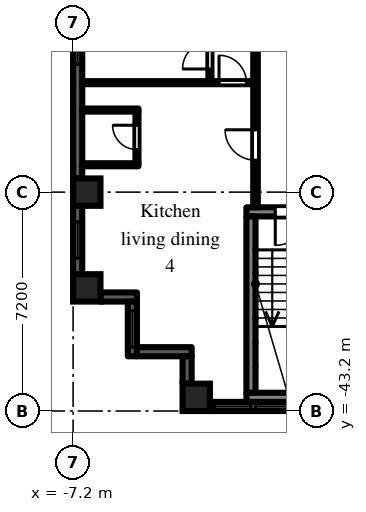
"""IFC4 building model, lengths in metres.
Left out: names, types, materials, properties, quantities, classifications, styles, units other than length and angle.
Written with IfcOpenShell. Run it as: python <this file> out.ifc"""

import sys

from ifc_helpers import new_model, si_unit, direction, frame, frame_2d, origin, origin_2d, place, context, subcontext, project, spatial, rectangle, extrude, element, fill, save


model = new_model("IFC4")
c1 = context("Model", 3, precision=1e-05, world=origin(), true_north=direction((0.0, 1.0)))
c2 = subcontext(c1, "Body", "Model", "MODEL_VIEW")
j1 = project(units=[si_unit("LENGTHUNIT", "METRE"), si_unit("PLANEANGLEUNIT", "RADIAN")], contexts=[c1])
p1 = place(None, origin())
s1 = spatial("IfcSite", under=j1, at=p1, CompositionType="ELEMENT")
p2 = place(p1, origin())
s2 = spatial("IfcBuilding", under=s1, at=p2, CompositionType="ELEMENT")
p3 = place(p2, frame((0.0, 0.0, 20.7)))
s3 = spatial("IfcBuildingStorey", under=s2, at=p3, CompositionType="ELEMENT", Elevation=20.7)
for number, where, z_axis, x_axis in (
    (1, (-6.75, -39.15, 0.0), (0.0, 0.0, 1.0), (1.0, 0.0, 0.0)),
    (2, (-6.75, -36.0, 0.0), (0.0, 0.0, 1.0), (1.0, 0.0, 0.0)),
    (3, (-3.15, -42.75, 0.0), (0.0, 0.0, 1.0), (1.0, 0.0, 0.0)),
):
    element("IfcColumn", number, at=place(p3, frame(where, z_axis=z_axis, x_axis=x_axis)), inside=s3, PredefinedType="COLUMN", context=c2, shape_type="SweptSolid", body=[
        extrude(rectangle(XDim=0.9, YDim=0.9, at=origin_2d()), origin(), (0.0, 0.0, 1.0), 3.0),
    ])
p4 = place(p3, frame((-7.05, -29.25, 0.0), z_axis=(0.0, 0.0, 1.0), x_axis=(0.0, -1.0, 0.0)))
e4 = element("IfcWall", 4, at=p4, inside=s3, PredefinedType="SOLIDWALL", context=c2, shape_type="SweptSolid", body=[
    extrude(rectangle(XDim=6.3, YDim=0.3, at=frame_2d((3.15, 0.0))), origin(), (0.0, 0.0, 1.0), 2.1),
])
p5 = place(p4, frame((0.15, 0.0, 0.2)))
e5 = element("IfcOpeningElement", 5, at=p5, cuts=e4, PredefinedType="OPENING", context=c2, shape_type="SweptSolid", body=[
    extrude(rectangle(XDim=2.4, YDim=1.85, at=frame_2d((1.2, 0.925))), frame((0.0, 0.16, 0.0), z_axis=(0.0, -1.0, 0.0), x_axis=(1.0, 0.0, 0.0)), (0.0, 0.0, 1.0), 0.32),
])
p6 = place(p3, frame((-7.05, -36.45, 0.0), z_axis=(0.0, 0.0, 1.0), x_axis=(0.0, -1.0, 0.0)))
e6 = element("IfcWall", 6, at=p6, inside=s3, PredefinedType="SOLIDWALL", context=c2, shape_type="SweptSolid", body=[
    extrude(rectangle(XDim=2.25, YDim=0.3, at=frame_2d((1.125, 0.0))), origin(), (0.0, 0.0, 1.0), 2.1),
])
p7 = place(p6, frame((0.525, 0.0, 0.2)))
e7 = element("IfcOpeningElement", 7, at=p7, cuts=e6, PredefinedType="OPENING", context=c2, shape_type="SweptSolid", body=[
    extrude(rectangle(XDim=1.2, YDim=1.85, at=frame_2d((0.6, 0.925))), frame((0.0, 0.16, 0.0), z_axis=(0.0, -1.0, 0.0), x_axis=(1.0, 0.0, 0.0)), (0.0, 0.0, 1.0), 0.32),
])
p8 = place(p3, frame((-6.3, -39.45, 0.0), z_axis=(0.0, 0.0, 1.0), x_axis=(1.0, 0.0, 0.0)))
e8 = element("IfcWall", 8, at=p8, inside=s3, PredefinedType="SOLIDWALL", context=c2, shape_type="SweptSolid", body=[
    extrude(rectangle(XDim=1.2, YDim=0.3, at=frame_2d((0.6, 0.0))), origin(), (0.0, 0.0, 1.0), 2.575),
])
p9 = place(p3, frame((-5.25, -39.6, 0.0), z_axis=(0.0, 0.0, 1.0), x_axis=(0.0, -1.0, 0.0)))
e9 = element("IfcWall", 9, at=p9, inside=s3, PredefinedType="SOLIDWALL", context=c2, shape_type="SweptSolid", body=[
    extrude(rectangle(XDim=1.8, YDim=0.3, at=frame_2d((0.9, 0.0))), origin(), (0.0, 0.0, 1.0), 2.575),
])
p10 = place(p9, frame((0.3, 0.0, 0.2)))
e10 = element("IfcOpeningElement", 10, at=p10, cuts=e9, PredefinedType="OPENING", context=c2, shape_type="SweptSolid", body=[
    extrude(rectangle(XDim=1.2, YDim=1.85, at=frame_2d((0.6, 0.925))), frame((0.0, 0.16, 0.0), z_axis=(0.0, -1.0, 0.0), x_axis=(1.0, 0.0, 0.0)), (0.0, 0.0, 1.0), 0.32),
])
p11 = place(p3, frame((-5.1, -41.25, 0.0), z_axis=(0.0, 0.0, 1.0), x_axis=(1.0, 0.0, 0.0)))
e11 = element("IfcWall", 11, at=p11, inside=s3, PredefinedType="SOLIDWALL", context=c2, shape_type="SweptSolid", body=[
    extrude(rectangle(XDim=1.8, YDim=0.3, at=frame_2d((0.9, 0.0))), origin(), (0.0, 0.0, 1.0), 2.575),
])
p12 = place(p3, frame((-3.45, -41.4, 0.0), z_axis=(0.0, 0.0, 1.0), x_axis=(0.0, -1.0, 0.0)))
e12 = element("IfcWall", 12, at=p12, inside=s3, PredefinedType="SOLIDWALL", context=c2, shape_type="SweptSolid", body=[
    extrude(rectangle(XDim=0.9, YDim=0.3, at=frame_2d((0.45, 0.0))), origin(), (0.0, 0.0, 1.0), 2.575),
])
p13 = place(p3, frame((-2.7, -43.05, 0.0), z_axis=(0.0, 0.0, 1.0), x_axis=(1.0, 0.0, 0.0)))
e13 = element("IfcWall", 13, at=p13, inside=s3, PredefinedType="SOLIDWALL", context=c2, shape_type="SweptSolid", body=[
    extrude(rectangle(XDim=5.4, YDim=0.3, at=frame_2d((2.7, 0.0))), origin(), (0.0, 0.0, 1.0), 2.1),
])
p14 = place(p13, frame((1.5, 0.0, 0.2)))
e14 = element("IfcOpeningElement", 14, at=p14, cuts=e13, PredefinedType="OPENING", context=c2, shape_type="SweptSolid", body=[
    extrude(rectangle(XDim=2.4, YDim=1.85, at=frame_2d((1.2, 0.925))), frame((0.0, 0.16, 0.0), z_axis=(0.0, -1.0, 0.0), x_axis=(1.0, 0.0, 0.0)), (0.0, 0.0, 1.0), 0.32),
])
p15 = place(p13, frame((0.15, 0.0, 0.2)))
e15 = element("IfcOpeningElement", 15, at=p15, cuts=e13, PredefinedType="OPENING", context=c2, shape_type="SweptSolid", body=[
    extrude(rectangle(XDim=1.2, YDim=1.85, at=frame_2d((0.6, 0.925))), frame((0.0, 0.16, 0.0), z_axis=(0.0, -1.0, 0.0), x_axis=(1.0, 0.0, 0.0)), (0.0, 0.0, 1.0), 0.32),
])
p16 = place(p13, frame((4.05, 0.0, 0.2)))
e16 = element("IfcOpeningElement", 16, at=p16, cuts=e13, PredefinedType="OPENING", context=c2, shape_type="SweptSolid", body=[
    extrude(rectangle(XDim=1.2, YDim=1.85, at=frame_2d((0.6, 0.925))), frame((0.0, 0.16, 0.0), z_axis=(0.0, -1.0, 0.0), x_axis=(1.0, 0.0, 0.0)), (0.0, 0.0, 1.0), 0.32),
])
p17 = place(p3, frame((-1.5, -36.65, 0.0), z_axis=(0.0, 0.0, 1.0), x_axis=(1.0, 0.0, 0.0)))
e17 = element("IfcWall", 17, at=p17, inside=s3, PredefinedType="SHEAR", context=c2, shape_type="SweptSolid", body=[
    extrude(rectangle(XDim=3.0, YDim=0.3, at=frame_2d((1.5, 0.0))), origin(), (0.0, 0.0, 1.0), 2.575),
])
p18 = place(p17, frame((0.95, 0.0, 0.0)))
e18 = element("IfcOpeningElement", 18, at=p18, cuts=e17, PredefinedType="OPENING", context=c2, shape_type="SweptSolid", body=[
    extrude(rectangle(XDim=1.1, YDim=2.1, at=frame_2d((0.55, 1.05))), frame((0.0, 0.16, 0.0), z_axis=(0.0, -1.0, 0.0), x_axis=(1.0, 0.0, 0.0)), (0.0, 0.0, 1.0), 0.32),
])
p19 = place(p3, frame((-1.5, -42.75, 0.0), z_axis=(0.0, 0.0, 1.0), x_axis=(1.0, 0.0, 0.0)))
e19 = element("IfcWall", 19, at=p19, inside=s3, PredefinedType="SHEAR", context=c2, shape_type="SweptSolid", body=[
    extrude(rectangle(XDim=3.0, YDim=0.3, at=frame_2d((1.5, 0.0))), origin(), (0.0, 0.0, 1.0), 2.575),
])
p20 = place(p3, frame((-1.35, -36.8, 0.0), z_axis=(0.0, 0.0, 1.0), x_axis=(0.0, -1.0, 0.0)))
e20 = element("IfcWall", 20, at=p20, inside=s3, PredefinedType="SHEAR", context=c2, shape_type="SweptSolid", body=[
    extrude(rectangle(XDim=5.8, YDim=0.3, at=frame_2d((2.9, 0.0))), origin(), (0.0, 0.0, 1.0), 2.575),
])
for number, where, z_axis, x_axis in (
    (21, (-6.9, -35.1, 0.0), (0.0, 0.0, 1.0), (1.0, 0.0, 0.0)),
    (22, (-6.9, -33.3, 0.0), (0.0, 0.0, 1.0), (1.0, 0.0, 0.0)),
):
    element("IfcWall", number, at=place(p3, frame(where, z_axis=z_axis, x_axis=x_axis)), inside=s3, PredefinedType="PARTITIONING", context=c2, shape_type="SweptSolid", body=[
        extrude(rectangle(XDim=1.85, YDim=0.1, at=frame_2d((0.925, 0.0))), origin(), (0.0, 0.0, 1.0), 2.575),
    ])
p21 = place(p3, frame((-6.9, -32.4, 0.0), z_axis=(0.0, 0.0, 1.0), x_axis=(1.0, 0.0, 0.0)))
e23 = element("IfcWall", 23, at=p21, inside=s3, PredefinedType="PARTITIONING", context=c2, shape_type="SweptSolid", body=[
    extrude(rectangle(XDim=5.625, YDim=0.1, at=frame_2d((2.812, 0.0))), origin(), (0.0, 0.0, 1.0), 2.575),
])
p22 = place(p21, frame((4.5, 0.0, 0.0)))
e24 = element("IfcOpeningElement", 24, at=p22, cuts=e23, PredefinedType="OPENING", context=c2, shape_type="SweptSolid", body=[
    extrude(rectangle(XDim=0.9, YDim=2.1, at=frame_2d((0.45, 1.05))), frame((0.0, 0.06, 0.0), z_axis=(0.0, -1.0, 0.0), x_axis=(1.0, 0.0, 0.0)), (0.0, 0.0, 1.0), 0.12),
])
p23 = place(p3, frame((-5.1, -35.05, 0.0), z_axis=(0.0, 0.0, 1.0), x_axis=(0.0, 1.0, 0.0)))
e25 = element("IfcWall", 25, at=p23, inside=s3, PredefinedType="PARTITIONING", context=c2, shape_type="SweptSolid", body=[
    extrude(rectangle(XDim=1.7, YDim=0.1, at=frame_2d((0.85, 0.0))), origin(), (0.0, 0.0, 1.0), 2.575),
])
p24 = place(p23, frame((0.45, 0.0, 0.0)))
e26 = element("IfcOpeningElement", 26, at=p24, cuts=e25, PredefinedType="OPENING", context=c2, shape_type="SweptSolid", body=[
    extrude(rectangle(XDim=0.8, YDim=2.1, at=frame_2d((0.4, 1.05))), frame((0.0, 0.06, 0.0), z_axis=(0.0, -1.0, 0.0), x_axis=(1.0, 0.0, 0.0)), (0.0, 0.0, 1.0), 0.12),
])
p25 = place(p3, frame((-2.7, -32.35, 0.0), z_axis=(0.0, 0.0, 1.0), x_axis=(0.0, 1.0, 0.0)))
e27 = element("IfcWall", 27, at=p25, inside=s3, PredefinedType="PARTITIONING", context=c2, shape_type="SweptSolid", body=[
    extrude(rectangle(XDim=14.3, YDim=0.1, at=frame_2d((7.15, 0.0))), origin(), (0.0, 0.0, 1.0), 2.575),
])
p26 = place(p25, frame((0.4, 0.0, 0.0)))
e28 = element("IfcOpeningElement", 28, at=p26, cuts=e27, PredefinedType="OPENING", context=c2, shape_type="SweptSolid", body=[
    extrude(rectangle(XDim=0.9, YDim=2.1, at=frame_2d((0.45, 1.05))), frame((0.0, 0.06, 0.0), z_axis=(0.0, -1.0, 0.0), x_axis=(1.0, 0.0, 0.0)), (0.0, 0.0, 1.0), 0.12),
])
p27 = place(p25, frame((5.8, 0.0, 0.0)))
e29 = element("IfcOpeningElement", 29, at=p27, cuts=e27, PredefinedType="OPENING", context=c2, shape_type="SweptSolid", body=[
    extrude(rectangle(XDim=0.9, YDim=2.1, at=frame_2d((0.45, 1.05))), frame((0.0, 0.06, 0.0), z_axis=(0.0, -1.0, 0.0), x_axis=(1.0, 0.0, 0.0)), (0.0, 0.0, 1.0), 0.12),
])
p28 = place(p25, frame((7.6, 0.0, 0.0)))
e30 = element("IfcOpeningElement", 30, at=p28, cuts=e27, PredefinedType="OPENING", context=c2, shape_type="SweptSolid", body=[
    extrude(rectangle(XDim=0.9, YDim=2.1, at=frame_2d((0.45, 1.05))), frame((0.0, 0.06, 0.0), z_axis=(0.0, -1.0, 0.0), x_axis=(1.0, 0.0, 0.0)), (0.0, 0.0, 1.0), 0.12),
])
p29 = place(p25, frame((13.0, 0.0, 0.0)))
e31 = element("IfcOpeningElement", 31, at=p29, cuts=e27, PredefinedType="OPENING", context=c2, shape_type="SweptSolid", body=[
    extrude(rectangle(XDim=0.9, YDim=2.1, at=frame_2d((0.45, 1.05))), frame((0.0, 0.06, 0.0), z_axis=(0.0, -1.0, 0.0), x_axis=(1.0, 0.0, 0.0)), (0.0, 0.0, 1.0), 0.12),
])
p30 = place(p3, frame((-1.2, -36.5, 0.0), z_axis=(0.0, 0.0, 1.0), x_axis=(0.0, 1.0, 0.0)))
e32 = element("IfcWall", 32, at=p30, inside=s3, PredefinedType="PARTITIONING", context=c2, shape_type="SweptSolid", body=[
    extrude(rectangle(XDim=35.225, YDim=0.15, at=frame_2d((17.613, 0.0))), origin(), (0.0, 0.0, 1.0), 2.575),
])
p31 = place(p30, frame((30.35, 0.0, 0.0)))
e33 = element("IfcOpeningElement", 33, at=p31, cuts=e32, PredefinedType="OPENING", context=c2, shape_type="SweptSolid", body=[
    extrude(rectangle(XDim=0.9, YDim=2.1, at=frame_2d((0.45, 1.05))), frame((0.0, 0.085, 0.0), z_axis=(0.0, -1.0, 0.0), x_axis=(1.0, 0.0, 0.0)), (0.0, 0.0, 1.0), 0.17),
])
p32 = place(p30, frame((23.05, 0.0, 0.0)))
e34 = element("IfcOpeningElement", 34, at=p32, cuts=e32, PredefinedType="OPENING", context=c2, shape_type="SweptSolid", body=[
    extrude(rectangle(XDim=0.9, YDim=2.1, at=frame_2d((0.45, 1.05))), frame((0.0, 0.085, 0.0), z_axis=(0.0, -1.0, 0.0), x_axis=(1.0, 0.0, 0.0)), (0.0, 0.0, 1.0), 0.17),
])
p33 = place(p30, frame((26.65, 0.0, 0.0)))
e35 = element("IfcOpeningElement", 35, at=p33, cuts=e32, PredefinedType="OPENING", context=c2, shape_type="SweptSolid", body=[
    extrude(rectangle(XDim=0.9, YDim=2.1, at=frame_2d((0.45, 1.05))), frame((0.0, 0.085, 0.0), z_axis=(0.0, -1.0, 0.0), x_axis=(1.0, 0.0, 0.0)), (0.0, 0.0, 1.0), 0.17),
])
p34 = place(p30, frame((19.85, 0.0, 0.0)))
e36 = element("IfcOpeningElement", 36, at=p34, cuts=e32, PredefinedType="OPENING", context=c2, shape_type="SweptSolid", body=[
    extrude(rectangle(XDim=0.9, YDim=2.1, at=frame_2d((0.45, 1.05))), frame((0.0, 0.085, 0.0), z_axis=(0.0, -1.0, 0.0), x_axis=(1.0, 0.0, 0.0)), (0.0, 0.0, 1.0), 0.17),
])
p35 = place(p30, frame((1.55, 0.0, 0.0)))
e37 = element("IfcOpeningElement", 37, at=p35, cuts=e32, PredefinedType="OPENING", context=c2, shape_type="SweptSolid", body=[
    extrude(rectangle(XDim=1.0, YDim=2.1, at=frame_2d((0.5, 1.05))), frame((0.0, 0.085, 0.0), z_axis=(0.0, -1.0, 0.0), x_axis=(1.0, 0.0, 0.0)), (0.0, 0.0, 1.0), 0.17),
])
p36 = place(p5, origin())
e38 = element("IfcWindow", 38, at=p36, inside=s3, PartitioningType="SINGLE_PANEL", PredefinedType="WINDOW", context=c2, shape_type="SweptSolid", body=[
    extrude(rectangle(XDim=2.4, YDim=1.85, at=frame_2d((1.2, 0.925))), frame((0.0, 0.03, 0.0), z_axis=(0.0, -1.0, 0.0), x_axis=(1.0, 0.0, 0.0)), (0.0, 0.0, 1.0), 0.06),
])
fill(e5, e38)
p37 = place(p7, origin())
e39 = element("IfcWindow", 39, at=p37, inside=s3, PartitioningType="SINGLE_PANEL", PredefinedType="WINDOW", context=c2, shape_type="SweptSolid", body=[
    extrude(rectangle(XDim=1.2, YDim=1.85, at=frame_2d((0.6, 0.925))), frame((0.0, 0.03, 0.0), z_axis=(0.0, -1.0, 0.0), x_axis=(1.0, 0.0, 0.0)), (0.0, 0.0, 1.0), 0.06),
])
fill(e7, e39)
p38 = place(p10, origin())
e40 = element("IfcWindow", 40, at=p38, inside=s3, PartitioningType="SINGLE_PANEL", PredefinedType="WINDOW", context=c2, shape_type="SweptSolid", body=[
    extrude(rectangle(XDim=1.2, YDim=1.85, at=frame_2d((0.6, 0.925))), frame((0.0, 0.03, 0.0), z_axis=(0.0, -1.0, 0.0), x_axis=(1.0, 0.0, 0.0)), (0.0, 0.0, 1.0), 0.06),
])
fill(e10, e40)
p39 = place(p14, origin())
e41 = element("IfcWindow", 41, at=p39, inside=s3, PartitioningType="SINGLE_PANEL", PredefinedType="WINDOW", context=c2, shape_type="SweptSolid", body=[
    extrude(rectangle(XDim=2.4, YDim=1.85, at=frame_2d((1.2, 0.925))), frame((0.0, 0.03, 0.0), z_axis=(0.0, -1.0, 0.0), x_axis=(1.0, 0.0, 0.0)), (0.0, 0.0, 1.0), 0.06),
])
fill(e14, e41)
p40 = place(p15, origin())
e42 = element("IfcWindow", 42, at=p40, inside=s3, PartitioningType="SINGLE_PANEL", PredefinedType="WINDOW", context=c2, shape_type="SweptSolid", body=[
    extrude(rectangle(XDim=1.2, YDim=1.85, at=frame_2d((0.6, 0.925))), frame((0.0, 0.03, 0.0), z_axis=(0.0, -1.0, 0.0), x_axis=(1.0, 0.0, 0.0)), (0.0, 0.0, 1.0), 0.06),
])
fill(e15, e42)
p41 = place(p18, frame((1.1, 0.0, 0.0), z_axis=(0.0, 0.0, 1.0), x_axis=(-1.0, 0.0, 0.0)))
e43 = element("IfcDoor", 43, at=p41, inside=s3, OperationType="SINGLE_SWING_RIGHT", PredefinedType="DOOR", context=c2, shape_type="SweptSolid", body=[
    extrude(rectangle(XDim=1.1, YDim=2.1, at=frame_2d((0.55, 1.05))), frame((0.0, 0.025, 0.0), z_axis=(0.0, -1.0, 0.0), x_axis=(1.0, 0.0, 0.0)), (0.0, 0.0, 1.0), 0.05),
])
fill(e18, e43)
p42 = place(p24, origin())
e44 = element("IfcDoor", 44, at=p42, inside=s3, OperationType="SINGLE_SWING_RIGHT", PredefinedType="DOOR", context=c2, shape_type="SweptSolid", body=[
    extrude(rectangle(XDim=0.8, YDim=2.1, at=frame_2d((0.4, 1.05))), frame((0.0, 0.025, 0.0), z_axis=(0.0, -1.0, 0.0), x_axis=(1.0, 0.0, 0.0)), (0.0, 0.0, 1.0), 0.05),
])
fill(e26, e44)
p43 = place(p35, origin())
e45 = element("IfcDoor", 45, at=p43, inside=s3, OperationType="SINGLE_SWING_RIGHT", PredefinedType="DOOR", context=c2, shape_type="SweptSolid", body=[
    extrude(rectangle(XDim=1.0, YDim=2.1, at=frame_2d((0.5, 1.05))), frame((0.0, 0.025, 0.0), z_axis=(0.0, -1.0, 0.0), x_axis=(1.0, 0.0, 0.0)), (0.0, 0.0, 1.0), 0.05),
])
fill(e37, e45)
p44 = place(p26, origin())
e46 = element("IfcDoor", 46, at=p44, inside=s3, OperationType="SINGLE_SWING_LEFT", PredefinedType="DOOR", context=c2, shape_type="SweptSolid", body=[
    extrude(rectangle(XDim=0.9, YDim=2.1, at=frame_2d((0.45, 1.05))), frame((0.0, 0.025, 0.0), z_axis=(0.0, -1.0, 0.0), x_axis=(1.0, 0.0, 0.0)), (0.0, 0.0, 1.0), 0.05),
])
fill(e28, e46)
p45 = place(p22, origin())
e47 = element("IfcDoor", 47, at=p45, inside=s3, OperationType="SINGLE_SWING_LEFT", PredefinedType="DOOR", context=c2, shape_type="SweptSolid", body=[
    extrude(rectangle(XDim=0.9, YDim=2.1, at=frame_2d((0.45, 1.05))), frame((0.0, 0.025, 0.0), z_axis=(0.0, -1.0, 0.0), x_axis=(1.0, 0.0, 0.0)), (0.0, 0.0, 1.0), 0.05),
])
fill(e24, e47)
save(model, sys.argv[1])
